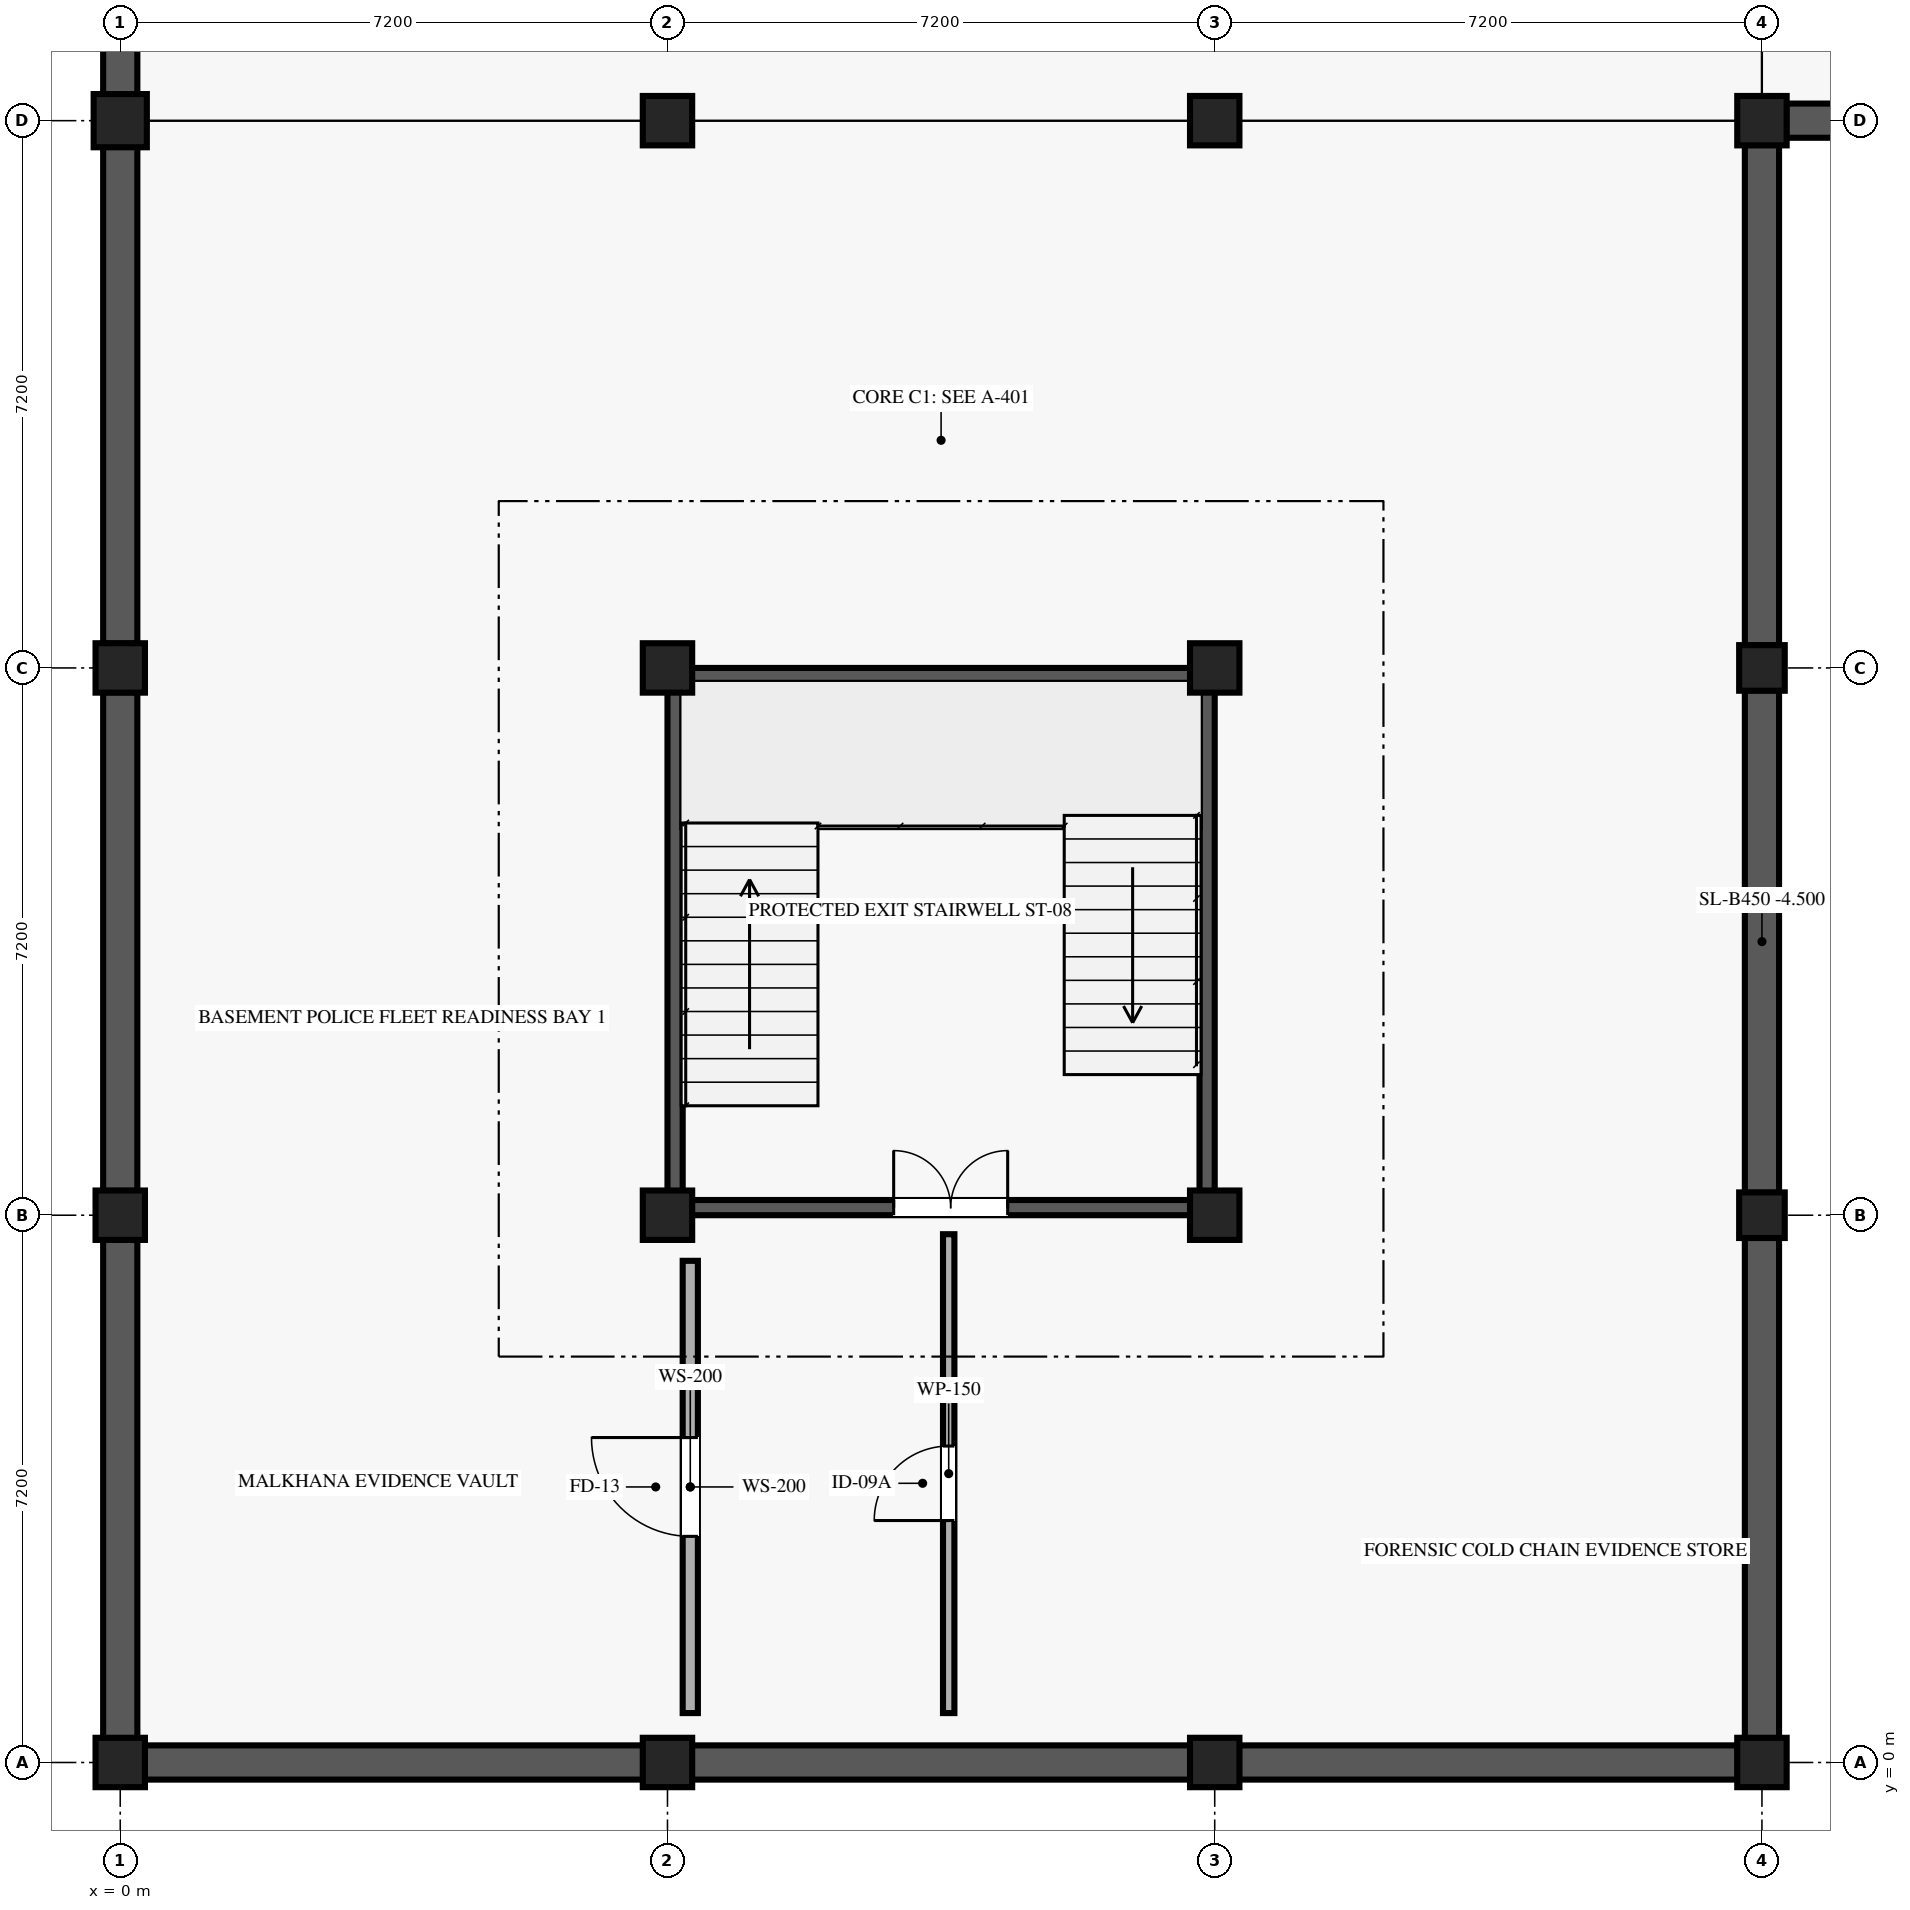
"""IFC4 building model, lengths in metres.
Left out: names, types, materials, properties, quantities, classifications, styles, units other than length and angle.
Written with IfcOpenShell. Run it as: python <this file> out.ifc"""

import sys

from ifc_helpers import new_model, si_unit, direction, frame, frame_2d, origin, origin_2d, place, context, subcontext, project, spatial, rectangle, extrude, element, fill, save


model = new_model("IFC4")
c1 = context("Model", 3, precision=1e-05, world=origin(), true_north=direction((0.0, 1.0)))
c2 = subcontext(c1, "Body", "Model", "MODEL_VIEW")
j1 = project(units=[si_unit("LENGTHUNIT", "METRE"), si_unit("PLANEANGLEUNIT", "RADIAN")], contexts=[c1])
p1 = place(None, origin())
s1 = spatial("IfcSite", under=j1, at=p1, CompositionType="ELEMENT")
p2 = place(p1, origin())
s2 = spatial("IfcBuilding", under=s1, at=p2, CompositionType="ELEMENT")
p3 = place(p2, frame((0.0, 0.0, -4.5)))
s3 = spatial("IfcBuildingStorey", under=s2, at=p3, CompositionType="ELEMENT", Elevation=-4.5)
for number, where, z_axis, x_axis in (
    (1, (0.0, 0.0, 0.0), (0.0, 0.0, 1.0), (1.0, 0.0, 0.0)),
    (2, (0.0, 7.2, 0.0), (0.0, 0.0, 1.0), (1.0, 0.0, 0.0)),
    (3, (0.0, 14.4, 0.0), (0.0, 0.0, 1.0), (1.0, 0.0, 0.0)),
):
    element("IfcColumn", number, at=place(p3, frame(where, z_axis=z_axis, x_axis=x_axis)), inside=s3, PredefinedType="COLUMN", context=c2, shape_type="SweptSolid", body=[
        extrude(rectangle(XDim=0.65, YDim=0.65, at=origin_2d()), origin(), (0.0, 0.0, 1.0), 4.5),
    ])
p4 = place(p3, frame((0.0, 21.6, 0.0), z_axis=(0.0, 0.0, 1.0), x_axis=(1.0, 0.0, 0.0)))
e4 = element("IfcColumn", 4, at=p4, inside=s3, PredefinedType="COLUMN", context=c2, shape_type="SweptSolid", body=[
    extrude(rectangle(XDim=0.7, YDim=0.7, at=origin_2d()), origin(), (0.0, 0.0, 1.0), 4.5),
])
for number, where, z_axis, x_axis in (
    (5, (7.2, 0.0, 0.0), (0.0, 0.0, 1.0), (1.0, 0.0, 0.0)),
    (6, (7.2, 7.2, 0.0), (0.0, 0.0, 1.0), (1.0, 0.0, 0.0)),
    (7, (7.2, 14.4, 0.0), (0.0, 0.0, 1.0), (1.0, 0.0, 0.0)),
    (8, (7.2, 21.6, 0.0), (0.0, 0.0, 1.0), (1.0, 0.0, 0.0)),
    (9, (14.4, 0.0, 0.0), (0.0, 0.0, 1.0), (1.0, 0.0, 0.0)),
    (10, (14.4, 7.2, 0.0), (0.0, 0.0, 1.0), (1.0, 0.0, 0.0)),
    (11, (14.4, 14.4, 0.0), (0.0, 0.0, 1.0), (1.0, 0.0, 0.0)),
    (12, (14.4, 21.6, 0.0), (0.0, 0.0, 1.0), (1.0, 0.0, 0.0)),
    (13, (21.6, 0.0, 0.0), (0.0, 0.0, 1.0), (1.0, 0.0, 0.0)),
):
    element("IfcColumn", number, at=place(p3, frame(where, z_axis=z_axis, x_axis=x_axis)), inside=s3, PredefinedType="COLUMN", context=c2, shape_type="SweptSolid", body=[
        extrude(rectangle(XDim=0.65, YDim=0.65, at=origin_2d()), origin(), (0.0, 0.0, 1.0), 4.5),
    ])
for number, where, z_axis, x_axis in (
    (14, (21.6, 7.2, 0.0), (0.0, 0.0, 1.0), (1.0, 0.0, 0.0)),
    (15, (21.6, 14.4, 0.0), (0.0, 0.0, 1.0), (1.0, 0.0, 0.0)),
):
    element("IfcColumn", number, at=place(p3, frame(where, z_axis=z_axis, x_axis=x_axis)), inside=s3, PredefinedType="COLUMN", context=c2, shape_type="SweptSolid", body=[
        extrude(rectangle(XDim=0.6, YDim=0.6, at=origin_2d()), origin(), (0.0, 0.0, 1.0), 4.5),
    ])
p5 = place(p3, frame((21.6, 21.6, 0.0), z_axis=(0.0, 0.0, 1.0), x_axis=(1.0, 0.0, 0.0)))
e16 = element("IfcColumn", 16, at=p5, inside=s3, PredefinedType="COLUMN", context=c2, shape_type="SweptSolid", body=[
    extrude(rectangle(XDim=0.65, YDim=0.65, at=origin_2d()), origin(), (0.0, 0.0, 1.0), 4.5),
])
p6 = place(p3, frame((0.32, 0.0, 0.0), z_axis=(0.0, 0.0, 1.0), x_axis=(1.0, 0.0, 0.0)))
e17 = element("IfcWall", 17, at=p6, inside=s3, PredefinedType="USERDEFINED", context=c2, shape_type="SweptSolid", body=[
    extrude(rectangle(XDim=6.56, YDim=0.45, at=frame_2d((3.28, 0.0))), origin(), (0.0, 0.0, 1.0), 4.25),
])
for number, where, z_axis, x_axis in (
    (18, (7.52, 0.0, 0.0), (0.0, 0.0, 1.0), (1.0, 0.0, 0.0)),
    (19, (14.72, 0.0, 0.0), (0.0, 0.0, 1.0), (1.0, 0.0, 0.0)),
    (20, (21.92, 21.6, 0.0), (0.0, 0.0, 1.0), (1.0, 0.0, 0.0)),
):
    element("IfcWall", number, at=place(p3, frame(where, z_axis=z_axis, x_axis=x_axis)), inside=s3, PredefinedType="USERDEFINED", context=c2, shape_type="SweptSolid", body=[
        extrude(rectangle(XDim=6.56, YDim=0.45, at=frame_2d((3.28, 0.0))), origin(), (0.0, 0.0, 1.0), 4.25),
    ])
p7 = place(p3, frame((0.0, 0.32, 0.0), z_axis=(0.0, 0.0, 1.0), x_axis=(0.0, 1.0, 0.0)))
e21 = element("IfcWall", 21, at=p7, inside=s3, PredefinedType="USERDEFINED", context=c2, shape_type="SweptSolid", body=[
    extrude(rectangle(XDim=6.56, YDim=0.45, at=frame_2d((3.28, 0.0))), origin(), (0.0, 0.0, 1.0), 4.25),
])
p8 = place(p3, frame((0.0, 7.52, 0.0), z_axis=(0.0, 0.0, 1.0), x_axis=(0.0, 1.0, 0.0)))
e22 = element("IfcWall", 22, at=p8, inside=s3, PredefinedType="USERDEFINED", context=c2, shape_type="SweptSolid", body=[
    extrude(rectangle(XDim=6.56, YDim=0.45, at=frame_2d((3.28, 0.0))), origin(), (0.0, 0.0, 1.0), 4.25),
])
for number, where, z_axis, x_axis in (
    (23, (0.0, 14.72, 0.0), (0.0, 0.0, 1.0), (0.0, 1.0, 0.0)),
    (24, (0.0, 21.945, 0.0), (0.0, 0.0, 1.0), (0.0, 1.0, 0.0)),
):
    element("IfcWall", number, at=place(p3, frame(where, z_axis=z_axis, x_axis=x_axis)), inside=s3, PredefinedType="USERDEFINED", context=c2, shape_type="SweptSolid", body=[
        extrude(rectangle(XDim=6.535, YDim=0.45, at=frame_2d((3.268, 0.0))), origin(), (0.0, 0.0, 1.0), 4.25),
    ])
p9 = place(p3, frame((21.6, 0.32, 0.0), z_axis=(0.0, 0.0, 1.0), x_axis=(0.0, 1.0, 0.0)))
e25 = element("IfcWall", 25, at=p9, inside=s3, PredefinedType="USERDEFINED", context=c2, shape_type="SweptSolid", body=[
    extrude(rectangle(XDim=6.585, YDim=0.45, at=frame_2d((3.292, 0.0))), origin(), (0.0, 0.0, 1.0), 4.25),
])
p10 = place(p3, frame((21.6, 7.495, 0.0), z_axis=(0.0, 0.0, 1.0), x_axis=(0.0, 1.0, 0.0)))
e26 = element("IfcWall", 26, at=p10, inside=s3, PredefinedType="USERDEFINED", context=c2, shape_type="SweptSolid", body=[
    extrude(rectangle(XDim=6.61, YDim=0.45, at=frame_2d((3.305, 0.0))), origin(), (0.0, 0.0, 1.0), 4.25),
])
p11 = place(p3, frame((21.6, 14.695, 0.0), z_axis=(0.0, 0.0, 1.0), x_axis=(0.0, 1.0, 0.0)))
e27 = element("IfcWall", 27, at=p11, inside=s3, PredefinedType="USERDEFINED", context=c2, shape_type="SweptSolid", body=[
    extrude(rectangle(XDim=6.585, YDim=0.45, at=frame_2d((3.292, 0.0))), origin(), (0.0, 0.0, 1.0), 4.25),
])
p12 = place(p3, frame((7.4, 7.3, 0.0), z_axis=(0.0, 0.0, 1.0), x_axis=(1.0, 0.0, 0.0)))
e28 = element("IfcWall", 28, at=p12, inside=s3, PredefinedType="SHEAR", context=c2, shape_type="SweptSolid", body=[
    extrude(rectangle(XDim=6.8, YDim=0.2, at=frame_2d((3.4, 0.0))), origin(), (0.0, 0.0, 1.0), 4.25),
])
p13 = place(p12, frame((2.776, 0.0, 0.0)))
e29 = element("IfcOpeningElement", 29, at=p13, cuts=e28, PredefinedType="OPENING", context=c2, shape_type="SweptSolid", body=[
    extrude(rectangle(XDim=1.5, YDim=2.15, at=frame_2d((0.75, 1.075))), frame((0.0, 0.11, 0.0), z_axis=(0.0, -1.0, 0.0), x_axis=(1.0, 0.0, 0.0)), (0.0, 0.0, 1.0), 0.22),
])
for number, where, z_axis, x_axis in (
    (30, (7.4, 14.3, 0.0), (0.0, 0.0, 1.0), (1.0, 0.0, 0.0)),
    (31, (7.3, 7.4, 0.0), (0.0, 0.0, 1.0), (0.0, 1.0, 0.0)),
    (32, (14.3, 7.4, 0.0), (0.0, 0.0, 1.0), (0.0, 1.0, 0.0)),
):
    element("IfcWall", number, at=place(p3, frame(where, z_axis=z_axis, x_axis=x_axis)), inside=s3, PredefinedType="SHEAR", context=c2, shape_type="SweptSolid", body=[
        extrude(rectangle(XDim=6.8, YDim=0.2, at=frame_2d((3.4, 0.0))), origin(), (0.0, 0.0, 1.0), 4.25),
    ])
p14 = place(p3, frame((7.5, 0.65, 0.0), z_axis=(0.0, 0.0, 1.0), x_axis=(0.0, 1.0, 0.0)))
e33 = element("IfcWall", 33, at=p14, inside=s3, PredefinedType="SOLIDWALL", context=c2, shape_type="SweptSolid", body=[
    extrude(rectangle(XDim=5.95, YDim=0.2, at=frame_2d((2.975, 0.0))), origin(), (0.0, 0.0, 1.0), 3.84),
])
p15 = place(p14, frame((2.325, 0.0, 0.0)))
e34 = element("IfcOpeningElement", 34, at=p15, cuts=e33, PredefinedType="OPENING", context=c2, shape_type="SweptSolid", body=[
    extrude(rectangle(XDim=1.3, YDim=2.2, at=frame_2d((0.65, 1.1))), frame((0.0, 0.11, 0.0), z_axis=(0.0, -1.0, 0.0), x_axis=(1.0, 0.0, 0.0)), (0.0, 0.0, 1.0), 0.22),
])
p16 = place(p3, frame((10.9, 0.65, 0.0), z_axis=(0.0, 0.0, 1.0), x_axis=(0.0, 1.0, 0.0)))
e35 = element("IfcWall", 35, at=p16, inside=s3, PredefinedType="PARTITIONING", context=c2, shape_type="SweptSolid", body=[
    extrude(rectangle(XDim=6.3, YDim=0.15, at=frame_2d((3.15, 0.0))), origin(), (0.0, 0.0, 1.0), 4.25),
])
p17 = place(p16, frame((2.533, 0.0, 0.0)))
e36 = element("IfcOpeningElement", 36, at=p17, cuts=e35, PredefinedType="OPENING", context=c2, shape_type="SweptSolid", body=[
    extrude(rectangle(XDim=0.98, YDim=2.1, at=frame_2d((0.49, 1.05))), frame((0.0, 0.085, 0.0), z_axis=(0.0, -1.0, 0.0), x_axis=(1.0, 0.0, 0.0)), (0.0, 0.0, 1.0), 0.17),
])
p18 = place(p13, origin())
e37 = element("IfcDoor", 37, at=p18, inside=s3, OperationType="DOUBLE_DOOR_SINGLE_SWING", PredefinedType="DOOR", context=c2, shape_type="SweptSolid", body=[
    extrude(rectangle(XDim=1.5, YDim=2.15, at=frame_2d((0.75, 1.075))), frame((0.0, 0.025, 0.0), z_axis=(0.0, -1.0, 0.0), x_axis=(1.0, 0.0, 0.0)), (0.0, 0.0, 1.0), 0.05),
])
fill(e29, e37)
p19 = place(p15, origin())
e38 = element("IfcDoor", 38, at=p19, inside=s3, OperationType="SINGLE_SWING_RIGHT", PredefinedType="DOOR", context=c2, shape_type="SweptSolid", body=[
    extrude(rectangle(XDim=1.3, YDim=2.2, at=frame_2d((0.65, 1.1))), frame((0.0, 0.025, 0.0), z_axis=(0.0, -1.0, 0.0), x_axis=(1.0, 0.0, 0.0)), (0.0, 0.0, 1.0), 0.05),
])
fill(e34, e38)
p20 = place(p17, origin())
e39 = element("IfcDoor", 39, at=p20, inside=s3, OperationType="SINGLE_SWING_LEFT", PredefinedType="DOOR", context=c2, shape_type="SweptSolid", body=[
    extrude(rectangle(XDim=0.98, YDim=2.1, at=frame_2d((0.49, 1.05))), frame((0.0, 0.025, 0.0), z_axis=(0.0, -1.0, 0.0), x_axis=(1.0, 0.0, 0.0)), (0.0, 0.0, 1.0), 0.05),
])
fill(e36, e39)
save(model, sys.argv[1])
